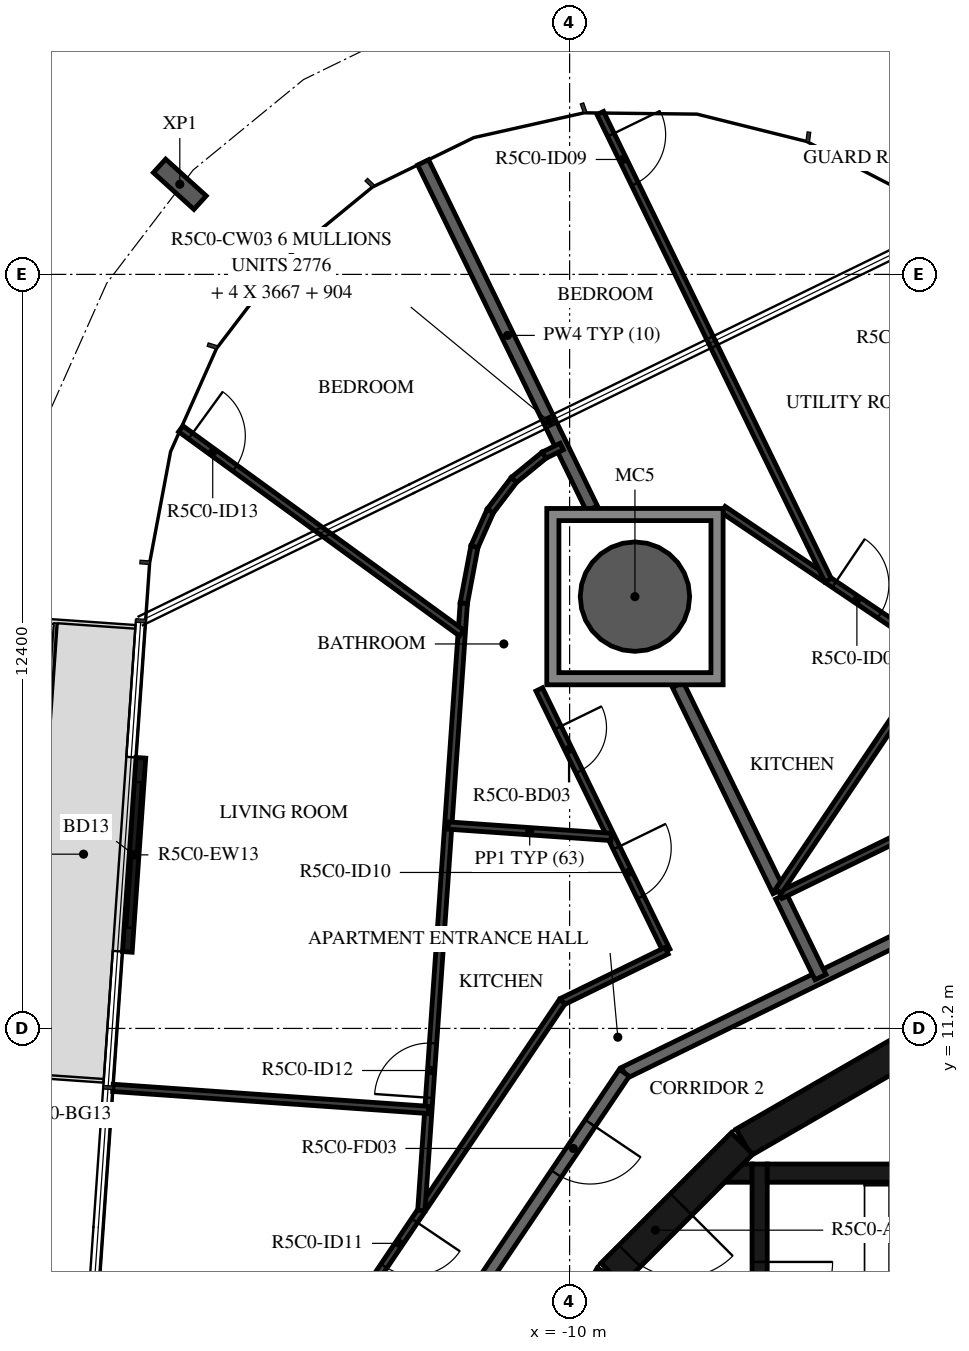
"""IFC4 building model, lengths in metres.
Left out: names, types, materials, properties, quantities, classifications, styles, units other than length and angle.
Written with IfcOpenShell. Run it as: python <this file> out.ifc"""

import sys

from ifc_helpers import new_model, si_unit, direction, frame, frame_2d, origin, origin_2d, place, context, subcontext, project, spatial, polyline, rectangle, hollow_circle, i_section, outline, extrude, element, fill, save


model = new_model("IFC4")
c1 = context("Model", 3, precision=1e-05, world=origin(), true_north=direction((0.0, 1.0)))
c2 = subcontext(c1, "Body", "Model", "MODEL_VIEW")
j1 = project(units=[si_unit("LENGTHUNIT", "METRE"), si_unit("PLANEANGLEUNIT", "RADIAN")], contexts=[c1])
p1 = place(None, origin())
s1 = spatial("IfcSite", under=j1, at=p1, CompositionType="ELEMENT")
p2 = place(p1, origin())
s2 = spatial("IfcBuilding", under=s1, at=p2, CompositionType="ELEMENT")
p3 = place(p2, frame((0.0, 0.0, 216.4)))
s3 = spatial("IfcBuildingStorey", under=s2, at=p3, CompositionType="ELEMENT", Elevation=216.4)
p4 = place(p3, frame((-8.926, 18.301, -0.38), z_axis=(0.0, 0.0, 1.0), x_axis=(1.0, 0.0, 0.0)))
e1 = element("IfcColumn", 1, at=p4, inside=s3, PredefinedType="COLUMN", context=c2, shape_type="SweptSolid", body=[
    extrude(hollow_circle(Radius=0.9, WallThickness=0.04, at=origin_2d()), origin(), (0.0, 0.0, 1.0), 2.616),
])
p5 = place(p3, frame((-16.411, 25.082, -0.38), z_axis=(0.0, 0.0, 1.0), x_axis=(0.671427897912, 0.741069887329, 0.0)))
e2 = element("IfcColumn", 2, at=p5, inside=s3, PredefinedType="COLUMN", context=c2, shape_type="SweptSolid", body=[
    extrude(i_section(OverallWidth=0.3, OverallDepth=0.9, WebThickness=0.019, FlangeThickness=0.035, FilletRadius=0.03, at=origin_2d()), origin(), (0.0, 0.0, 1.0), 2.616),
])
p6 = place(p3, frame((-17.051, 15.65, 0.0), z_axis=(0.0, 0.0, 1.0), x_axis=(-0.069734222855, -0.997565605944, 0.0)))
e3 = element("IfcWall", 3, at=p6, inside=s3, PredefinedType="STANDARD", context=c2, shape_type="SweptSolid", body=[
    extrude(rectangle(XDim=3.2, YDim=0.16, at=frame_2d((1.6, 0.0))), origin(), (0.0, 0.0, 1.0), 3.05),
])
p7 = place(p6, frame((0.4, 0.0, 0.0)))
e4 = element("IfcOpeningElement", 4, at=p7, cuts=e3, PredefinedType="OPENING", context=c2, shape_type="SweptSolid", body=[
    extrude(rectangle(XDim=2.4, YDim=2.4, at=frame_2d((1.2, 1.2))), frame((0.0, 0.09, 0.0), z_axis=(0.0, -1.0, 0.0), x_axis=(1.0, 0.0, 0.0)), (0.0, 0.0, 1.0), 0.18),
])
p8 = place(p3, frame((-4.51, 10.845, 0.0), z_axis=(0.0, 0.0, 1.0), x_axis=(-0.865975092491, -0.500087131594, 0.0)))
e5 = element("IfcWall", 5, at=p8, inside=s3, PredefinedType="SHEAR", context=c2, shape_type="SweptSolid", body=[
    extrude(rectangle(XDim=3.033, YDim=0.5, at=frame_2d((1.516, 0.0))), origin(), (0.0, 0.0, 1.0), 3.05),
])
p9 = place(p3, frame((-7.164, 9.308, 0.0), z_axis=(0.0, 0.0, 1.0), x_axis=(-0.707106781187, -0.707106781187, 0.0)))
e6 = element("IfcWall", 6, at=p9, inside=s3, PredefinedType="SHEAR", context=c2, shape_type="SweptSolid", body=[
    extrude(rectangle(XDim=3.032, YDim=0.5, at=frame_2d((1.516, 0.0))), origin(), (0.0, 0.0, 1.0), 3.05),
])
p10 = place(p9, frame((1.416, 0.0, 0.0)))
e7 = element("IfcOpeningElement", 7, at=p10, cuts=e6, PredefinedType="OPENING", context=c2, shape_type="SweptSolid", body=[
    extrude(rectangle(XDim=1.2, YDim=2.1, at=frame_2d((0.6, 1.05))), frame((0.0, 0.26, 0.0), z_axis=(0.0, -1.0, 0.0), x_axis=(1.0, 0.0, 0.0)), (0.0, 0.0, 1.0), 0.52),
])
p11 = place(p3, frame((-9.329, 7.137, 0.0), z_axis=(0.0, 0.0, 1.0), x_axis=(-0.500087131594, -0.865975092491, 0.0)))
e8 = element("IfcWall", 8, at=p11, inside=s3, PredefinedType="SHEAR", context=c2, shape_type="SweptSolid", body=[
    extrude(rectangle(XDim=3.033, YDim=0.5, at=frame_2d((1.516, 0.0))), origin(), (0.0, 0.0, 1.0), 3.05),
])
p12 = place(p3, frame((-6.75, 8.82, 0.0), z_axis=(0.0, 0.0, 1.0), x_axis=(1.0, 0.0, 0.0)))
e9 = element("IfcWall", 9, at=p12, inside=s3, PredefinedType="SHEAR", context=c2, shape_type="SweptSolid", body=[
    extrude(rectangle(XDim=6.75, YDim=0.3, at=frame_2d((3.375, 0.0))), origin(), (0.0, 0.0, 1.0), 3.05),
])
p13 = place(p3, frame((-6.875, 8.97, 0.0), z_axis=(0.0, 0.0, 1.0), x_axis=(0.0, -1.0, 0.0)))
e10 = element("IfcWall", 10, at=p13, inside=s3, PredefinedType="SHEAR", context=c2, shape_type="SweptSolid", body=[
    extrude(rectangle(XDim=3.92, YDim=0.25, at=frame_2d((1.96, 0.0))), origin(), (0.0, 0.0, 1.0), 3.05),
])
p14 = place(p13, frame((1.61, 0.0, 0.0)))
e11 = element("IfcOpeningElement", 11, at=p14, cuts=e10, PredefinedType="OPENING", context=c2, shape_type="SweptSolid", body=[
    extrude(rectangle(XDim=1.2, YDim=2.1, at=frame_2d((0.6, 1.05))), frame((0.0, 0.135, 0.0), z_axis=(0.0, -1.0, 0.0), x_axis=(1.0, 0.0, 0.0)), (0.0, 0.0, 1.0), 0.27),
])
p15 = place(p3, origin())
e12 = element("IfcWall", 12, at=p15, inside=s3, PredefinedType="SHEAR", context=c2, shape_type="SweptSolid", body=[
    extrude(outline(polyline([(-7.148, 8.97), (-7.0, 8.97), (-7.0, 8.67), (-7.448, 8.67), (-7.148, 8.97)])), origin(), (0.0, 0.0, 1.0), 3.05),
])
p16 = place(p3, frame((-2.647, 13.618, 0.0), z_axis=(0.0, 0.0, 1.0), x_axis=(-0.898796543751, -0.438366026218, 0.0)))
e13 = element("IfcWall", 13, at=p16, inside=s3, PredefinedType="STANDARD", context=c2, shape_type="SweptSolid", body=[
    extrude(rectangle(XDim=7.181, YDim=0.2, at=frame_2d((3.591, 0.0))), origin(), (0.0, 0.0, 1.0), 3.05),
])
p17 = place(p3, frame((-9.101, 10.47, 0.0), z_axis=(0.0, 0.0, 1.0), x_axis=(-0.559195469534, -0.829035841718, 0.0)))
e14 = element("IfcWall", 14, at=p17, inside=s3, PredefinedType="STANDARD", context=c2, shape_type="SweptSolid", body=[
    extrude(rectangle(XDim=7.181, YDim=0.2, at=frame_2d((3.591, 0.0))), origin(), (0.0, 0.0, 1.0), 3.05),
])
p18 = place(p17, frame((1.0, 0.0, 0.0)))
e15 = element("IfcOpeningElement", 15, at=p18, cuts=e14, PredefinedType="OPENING", context=c2, shape_type="SweptSolid", body=[
    extrude(rectangle(XDim=1.0, YDim=2.1, at=frame_2d((0.5, 1.05))), frame((0.0, 0.11, 0.0), z_axis=(0.0, -1.0, 0.0), x_axis=(1.0, 0.0, 0.0)), (0.0, 0.0, 1.0), 0.22),
])
p19 = place(p3, frame((-6.522, 13.373, 0.0), z_axis=(0.0, 0.0, 1.0), x_axis=(0.438277270821, -0.8988398266, 0.0)))
e16 = element("IfcWall", 16, at=p19, inside=s3, PredefinedType="STANDARD", context=c2, shape_type="SweptSolid", body=[
    extrude(rectangle(XDim=1.479, YDim=0.2, at=frame_2d((0.74, 0.0))), origin(), (0.0, 0.0, 1.0), 3.05),
])
p20 = place(p3, frame((-8.219, 16.851, 0.0), z_axis=(0.0, 0.0, 1.0), x_axis=(0.438291091101, -0.898833087654, 0.0)))
e17 = element("IfcWall", 17, at=p20, inside=s3, PredefinedType="STANDARD", context=c2, shape_type="SweptSolid", body=[
    extrude(rectangle(XDim=3.774, YDim=0.2, at=frame_2d((1.887, 0.0))), origin(), (0.0, 0.0, 1.0), 3.05),
])
p21 = place(p3, frame((-12.409, 25.442, 0.0), z_axis=(0.0, 0.0, 1.0), x_axis=(0.43838641251, -0.898786600549, 0.0)))
e18 = element("IfcWall", 18, at=p21, inside=s3, PredefinedType="STANDARD", context=c2, shape_type="SweptSolid", body=[
    extrude(rectangle(XDim=6.333, YDim=0.2, at=frame_2d((3.166, 0.0))), origin(), (0.0, 0.0, 1.0), 3.05),
])
p22 = place(p3, frame((-2.943, 15.142, 0.0), z_axis=(0.0, 0.0, 1.0), x_axis=(-0.89881075705, -0.438336883014, 0.0)))
e19 = element("IfcWall", 19, at=p22, inside=s3, PredefinedType="PARTITIONING", context=c2, shape_type="SweptSolid", body=[
    extrude(rectangle(XDim=3.992, YDim=0.12, at=frame_2d((1.996, 0.0))), origin(), (0.0, 0.0, 1.0), 3.05),
])
p23 = place(p3, frame((-7.476, 19.735, 0.0), z_axis=(0.0, 0.0, 1.0), x_axis=(0.829035412992, -0.559196105142, 0.0)))
e20 = element("IfcWall", 20, at=p23, inside=s3, PredefinedType="PARTITIONING", context=c2, shape_type="SweptSolid", body=[
    extrude(rectangle(XDim=8.531, YDim=0.12, at=frame_2d((4.266, 0.0))), origin(), (0.0, 0.0, 1.0), 3.05),
])
p24 = place(p23, frame((2.204, 0.0, 0.0)))
e21 = element("IfcOpeningElement", 21, at=p24, cuts=e20, PredefinedType="OPENING", context=c2, shape_type="SweptSolid", body=[
    extrude(rectangle(XDim=0.9, YDim=2.1, at=frame_2d((0.45, 1.05))), frame((0.0, 0.07, 0.0), z_axis=(0.0, -1.0, 0.0), x_axis=(1.0, 0.0, 0.0)), (0.0, 0.0, 1.0), 0.14),
])
p25 = place(p3, frame((-3.939, 17.35, 0.0), z_axis=(0.0, 0.0, 1.0), x_axis=(-0.559193216274, -0.829037361566, 0.0)))
e22 = element("IfcWall", 22, at=p25, inside=s3, PredefinedType="PARTITIONING", context=c2, shape_type="SweptSolid", body=[
    extrude(rectangle(XDim=4.694, YDim=0.12, at=frame_2d((2.347, 0.0))), origin(), (0.0, 0.0, 1.0), 3.05),
])
p26 = place(p3, frame((-9.496, 26.254, 0.0), z_axis=(0.0, 0.0, 1.0), x_axis=(0.438361739807, -0.89879863433, 0.0)))
e23 = element("IfcWall", 23, at=p26, inside=s3, PredefinedType="PARTITIONING", context=c2, shape_type="SweptSolid", body=[
    extrude(rectangle(XDim=8.549, YDim=0.12, at=frame_2d((4.274, 0.0))), origin(), (0.0, 0.0, 1.0), 3.05),
])
p27 = place(p26, frame((0.4, 0.0, 0.0)))
e24 = element("IfcOpeningElement", 24, at=p27, cuts=e23, PredefinedType="OPENING", context=c2, shape_type="SweptSolid", body=[
    extrude(rectangle(XDim=0.9, YDim=2.1, at=frame_2d((0.45, 1.05))), frame((0.0, 0.07, 0.0), z_axis=(0.0, -1.0, 0.0), x_axis=(1.0, 0.0, 0.0)), (0.0, 0.0, 1.0), 0.14),
])
p28 = place(p3, frame((-10.5, 16.775, 0.0), z_axis=(0.0, 0.0, 1.0), x_axis=(0.438345136783, -0.898806731761, 0.0)))
e25 = element("IfcWall", 25, at=p28, inside=s3, PredefinedType="PARTITIONING", context=c2, shape_type="SweptSolid", body=[
    extrude(rectangle(XDim=4.78, YDim=0.12, at=frame_2d((2.39, 0.0))), origin(), (0.0, 0.0, 1.0), 3.05),
])
p29 = place(p28, frame((0.7, 0.0, 0.0)))
e26 = element("IfcOpeningElement", 26, at=p29, cuts=e25, PredefinedType="OPENING", context=c2, shape_type="SweptSolid", body=[
    extrude(rectangle(XDim=0.8, YDim=2.1, at=frame_2d((0.4, 1.05))), frame((0.0, 0.07, 0.0), z_axis=(0.0, -1.0, 0.0), x_axis=(1.0, 0.0, 0.0)), (0.0, 0.0, 1.0), 0.14),
])
p30 = place(p28, frame((2.899, 0.0, 0.0)))
e27 = element("IfcOpeningElement", 27, at=p30, cuts=e25, PredefinedType="OPENING", context=c2, shape_type="SweptSolid", body=[
    extrude(rectangle(XDim=0.9, YDim=2.1, at=frame_2d((0.45, 1.05))), frame((0.0, 0.07, 0.0), z_axis=(0.0, -1.0, 0.0), x_axis=(1.0, 0.0, 0.0)), (0.0, 0.0, 1.0), 0.14),
])
p31 = place(p3, frame((-8.405, 12.479, 0.0), z_axis=(0.0, 0.0, 1.0), x_axis=(-0.898784427692, -0.438390867307, 0.0)))
e28 = element("IfcWall", 28, at=p31, inside=s3, PredefinedType="PARTITIONING", context=c2, shape_type="SweptSolid", body=[
    extrude(rectangle(XDim=1.908, YDim=0.12, at=frame_2d((0.954, 0.0))), origin(), (0.0, 0.0, 1.0), 3.05),
])
p32 = place(p3, frame((-10.12, 11.642, 0.0), z_axis=(0.0, 0.0, 1.0), x_axis=(-0.55920080659, -0.829032241779, 0.0)))
e29 = element("IfcWall", 29, at=p32, inside=s3, PredefinedType="PARTITIONING", context=c2, shape_type="SweptSolid", body=[
    extrude(rectangle(XDim=7.985, YDim=0.12, at=frame_2d((3.992, 0.0))), origin(), (0.0, 0.0, 1.0), 3.05),
])
p33 = place(p32, frame((4.346, 0.0, 0.0)))
e30 = element("IfcOpeningElement", 30, at=p33, cuts=e29, PredefinedType="OPENING", context=c2, shape_type="SweptSolid", body=[
    extrude(rectangle(XDim=0.9, YDim=2.1, at=frame_2d((0.45, 1.05))), frame((0.0, 0.07, 0.0), z_axis=(0.0, -1.0, 0.0), x_axis=(1.0, 0.0, 0.0)), (0.0, 0.0, 1.0), 0.14),
])
p34 = place(p3, frame((-12.439, 8.204, 0.0), z_axis=(0.0, 0.0, 1.0), x_axis=(0.069750037523, 0.997564500303, 0.0)))
e31 = element("IfcWall", 31, at=p34, inside=s3, PredefinedType="PARTITIONING", context=c2, shape_type="SweptSolid", body=[
    extrude(rectangle(XDim=10.014, YDim=0.12, at=frame_2d((5.007, 0.0))), origin(), (0.0, 0.0, 1.0), 3.05),
])
p35 = place(p34, frame((1.859, 0.0, 0.0)))
e32 = element("IfcOpeningElement", 32, at=p35, cuts=e31, PredefinedType="OPENING", context=c2, shape_type="SweptSolid", body=[
    extrude(rectangle(XDim=0.9, YDim=2.1, at=frame_2d((0.45, 1.05))), frame((0.0, 0.07, 0.0), z_axis=(0.0, -1.0, 0.0), x_axis=(1.0, 0.0, 0.0)), (0.0, 0.0, 1.0), 0.14),
])
p36 = place(p3, frame((-11.74, 18.194, 0.0), z_axis=(0.0, 0.0, 1.0), x_axis=(0.185144760846, 0.982711258474, 0.0)))
e33 = element("IfcWall", 33, at=p36, inside=s3, PredefinedType="PARTITIONING", context=c2, shape_type="SweptSolid", body=[
    extrude(rectangle(XDim=0.947, YDim=0.12, at=frame_2d((0.473, 0.0))), origin(), (0.0, 0.0, 1.0), 3.05),
])
for number, where, z_axis, x_axis in (
    (34, (-11.565, 19.125, 0.0), (0.0, 0.0, 1.0), (0.407, 0.914, 0.0)),
    (35, (-11.304, 19.711, 0.0), (0.0, 0.0, 1.0), (0.607, 0.795, 0.0)),
    (36, (-10.915, 20.221, 0.0), (0.0, 0.0, 1.0), (0.773, 0.634, 0.0)),
):
    element("IfcWall", number, at=place(p3, frame(where, z_axis=z_axis, x_axis=x_axis)), inside=s3, PredefinedType="PARTITIONING", context=c2, shape_type="SweptSolid", body=[
        extrude(rectangle(XDim=0.642, YDim=0.12, at=frame_2d((0.321, 0.0))), origin(), (0.0, 0.0, 1.0), 3.05),
    ])
p37 = place(p3, frame((-10.418, 20.628, 0.0), z_axis=(0.0, 0.0, 1.0), x_axis=(0.898943795765, 0.438063981692, 0.0)))
e37 = element("IfcWall", 37, at=p37, inside=s3, PredefinedType="PARTITIONING", context=c2, shape_type="SweptSolid", body=[
    extrude(rectangle(XDim=0.321, YDim=0.12, at=frame_2d((0.161, 0.0))), origin(), (0.0, 0.0, 1.0), 3.05),
])
p38 = place(p3, frame((-16.395, 21.061, 0.0), z_axis=(0.0, 0.0, 1.0), x_axis=(0.808810002497, -0.58807004673, 0.0)))
e38 = element("IfcWall", 38, at=p38, inside=s3, PredefinedType="PARTITIONING", context=c2, shape_type="SweptSolid", body=[
    extrude(rectangle(XDim=5.713, YDim=0.12, at=frame_2d((2.856, 0.0))), origin(), (0.0, 0.0, 1.0), 3.05),
])
p39 = place(p38, frame((0.2, 0.0, 0.0)))
e39 = element("IfcOpeningElement", 39, at=p39, cuts=e38, PredefinedType="OPENING", context=c2, shape_type="SweptSolid", body=[
    extrude(rectangle(XDim=0.9, YDim=2.1, at=frame_2d((0.45, 1.05))), frame((0.0, 0.07, 0.0), z_axis=(0.0, -1.0, 0.0), x_axis=(1.0, 0.0, 0.0)), (0.0, 0.0, 1.0), 0.14),
])
p40 = place(p3, frame((-11.996, 14.536, 0.0), z_axis=(0.0, 0.0, 1.0), x_axis=(0.997565991425, -0.069728708231, 0.0)))
e40 = element("IfcWall", 40, at=p40, inside=s3, PredefinedType="PARTITIONING", context=c2, shape_type="SweptSolid", body=[
    extrude(rectangle(XDim=2.686, YDim=0.12, at=frame_2d((1.343, 0.0))), origin(), (0.0, 0.0, 1.0), 3.05),
])
p41 = place(p3, frame((-17.51, 10.222, 0.0), z_axis=(0.0, 0.0, 1.0), x_axis=(0.997563184303, -0.069768856397, 0.0)))
e41 = element("IfcWall", 41, at=p41, inside=s3, PredefinedType="PARTITIONING", context=c2, shape_type="SweptSolid", body=[
    extrude(rectangle(XDim=5.2, YDim=0.12, at=frame_2d((2.6, 0.0))), origin(), (0.0, 0.0, 1.0), 3.05),
])
p42 = place(p3, origin())
e42 = element("IfcWall", 42, at=p42, inside=s3, PredefinedType="STANDARD", context=c2, shape_type="SweptSolid", body=[
    extrude(outline(polyline([(-7.476, 19.751), (-7.476, 16.851), (-10.376, 16.851), (-10.376, 19.751), (-7.476, 19.751)]), holes=[polyline([(-10.176, 17.051), (-7.676, 17.051), (-7.676, 19.551), (-10.176, 19.551), (-10.176, 17.051)])]), origin(), (0.0, 0.0, 1.0), 3.05),
])
p43 = place(p7, origin())
e43 = element("IfcDoor", 43, at=p43, inside=s3, OperationType="DOUBLE_DOOR_SLIDING", PredefinedType="DOOR", context=c2, shape_type="SweptSolid", body=[
    extrude(rectangle(XDim=2.4, YDim=2.4, at=frame_2d((1.2, 1.2))), frame((0.0, 0.025, 0.0), z_axis=(0.0, -1.0, 0.0), x_axis=(1.0, 0.0, 0.0)), (0.0, 0.0, 1.0), 0.05),
])
fill(e4, e43)
p44 = place(p14, origin())
e44 = element("IfcDoor", 44, at=p44, inside=s3, OperationType="SINGLE_SWING_LEFT", PredefinedType="DOOR", context=c2, shape_type="SweptSolid", body=[
    extrude(rectangle(XDim=1.2, YDim=2.1, at=frame_2d((0.6, 1.05))), frame((0.0, 0.025, 0.0), z_axis=(0.0, -1.0, 0.0), x_axis=(1.0, 0.0, 0.0)), (0.0, 0.0, 1.0), 0.05),
])
fill(e11, e44)
p45 = place(p10, origin())
e45 = element("IfcDoor", 45, at=p45, inside=s3, OperationType="SINGLE_SWING_RIGHT", PredefinedType="DOOR", context=c2, shape_type="SweptSolid", body=[
    extrude(rectangle(XDim=1.2, YDim=2.1, at=frame_2d((0.6, 1.05))), frame((0.0, 0.025, 0.0), z_axis=(0.0, -1.0, 0.0), x_axis=(1.0, 0.0, 0.0)), (0.0, 0.0, 1.0), 0.05),
])
fill(e7, e45)
p46 = place(p24, origin())
e46 = element("IfcDoor", 46, at=p46, inside=s3, OperationType="SINGLE_SWING_LEFT", PredefinedType="DOOR", context=c2, shape_type="SweptSolid", body=[
    extrude(rectangle(XDim=0.9, YDim=2.1, at=frame_2d((0.45, 1.05))), frame((0.0, 0.025, 0.0), z_axis=(0.0, -1.0, 0.0), x_axis=(1.0, 0.0, 0.0)), (0.0, 0.0, 1.0), 0.05),
])
fill(e21, e46)
p47 = place(p27, origin())
e47 = element("IfcDoor", 47, at=p47, inside=s3, OperationType="SINGLE_SWING_RIGHT", PredefinedType="DOOR", context=c2, shape_type="SweptSolid", body=[
    extrude(rectangle(XDim=0.9, YDim=2.1, at=frame_2d((0.45, 1.05))), frame((0.0, 0.025, 0.0), z_axis=(0.0, -1.0, 0.0), x_axis=(1.0, 0.0, 0.0)), (0.0, 0.0, 1.0), 0.05),
])
fill(e24, e47)
p48 = place(p18, origin())
e48 = element("IfcDoor", 48, at=p48, inside=s3, OperationType="SINGLE_SWING_LEFT", PredefinedType="DOOR", context=c2, shape_type="SweptSolid", body=[
    extrude(rectangle(XDim=1.0, YDim=2.1, at=frame_2d((0.5, 1.05))), frame((0.0, 0.025, 0.0), z_axis=(0.0, -1.0, 0.0), x_axis=(1.0, 0.0, 0.0)), (0.0, 0.0, 1.0), 0.05),
])
fill(e15, e48)
p49 = place(p29, origin())
e49 = element("IfcDoor", 49, at=p49, inside=s3, OperationType="SINGLE_SWING_LEFT", PredefinedType="DOOR", context=c2, shape_type="SweptSolid", body=[
    extrude(rectangle(XDim=0.8, YDim=2.1, at=frame_2d((0.4, 1.05))), frame((0.0, 0.025, 0.0), z_axis=(0.0, -1.0, 0.0), x_axis=(1.0, 0.0, 0.0)), (0.0, 0.0, 1.0), 0.05),
])
fill(e26, e49)
p50 = place(p30, origin())
e50 = element("IfcDoor", 50, at=p50, inside=s3, OperationType="SINGLE_SWING_LEFT", PredefinedType="DOOR", context=c2, shape_type="SweptSolid", body=[
    extrude(rectangle(XDim=0.9, YDim=2.1, at=frame_2d((0.45, 1.05))), frame((0.0, 0.025, 0.0), z_axis=(0.0, -1.0, 0.0), x_axis=(1.0, 0.0, 0.0)), (0.0, 0.0, 1.0), 0.05),
])
fill(e27, e50)
p51 = place(p33, origin())
e51 = element("IfcDoor", 51, at=p51, inside=s3, OperationType="SINGLE_SWING_LEFT", PredefinedType="DOOR", context=c2, shape_type="SweptSolid", body=[
    extrude(rectangle(XDim=0.9, YDim=2.1, at=frame_2d((0.45, 1.05))), frame((0.0, 0.025, 0.0), z_axis=(0.0, -1.0, 0.0), x_axis=(1.0, 0.0, 0.0)), (0.0, 0.0, 1.0), 0.05),
])
fill(e30, e51)
p52 = place(p35, origin())
e52 = element("IfcDoor", 52, at=p52, inside=s3, OperationType="SINGLE_SWING_LEFT", PredefinedType="DOOR", context=c2, shape_type="SweptSolid", body=[
    extrude(rectangle(XDim=0.9, YDim=2.1, at=frame_2d((0.45, 1.05))), frame((0.0, 0.025, 0.0), z_axis=(0.0, -1.0, 0.0), x_axis=(1.0, 0.0, 0.0)), (0.0, 0.0, 1.0), 0.05),
])
fill(e32, e52)
p53 = place(p39, origin())
e53 = element("IfcDoor", 53, at=p53, inside=s3, OperationType="SINGLE_SWING_LEFT", PredefinedType="DOOR", context=c2, shape_type="SweptSolid", body=[
    extrude(rectangle(XDim=0.9, YDim=2.1, at=frame_2d((0.45, 1.05))), frame((0.0, 0.025, 0.0), z_axis=(0.0, -1.0, 0.0), x_axis=(1.0, 0.0, 0.0)), (0.0, 0.0, 1.0), 0.05),
])
fill(e39, e53)
save(model, sys.argv[1])
